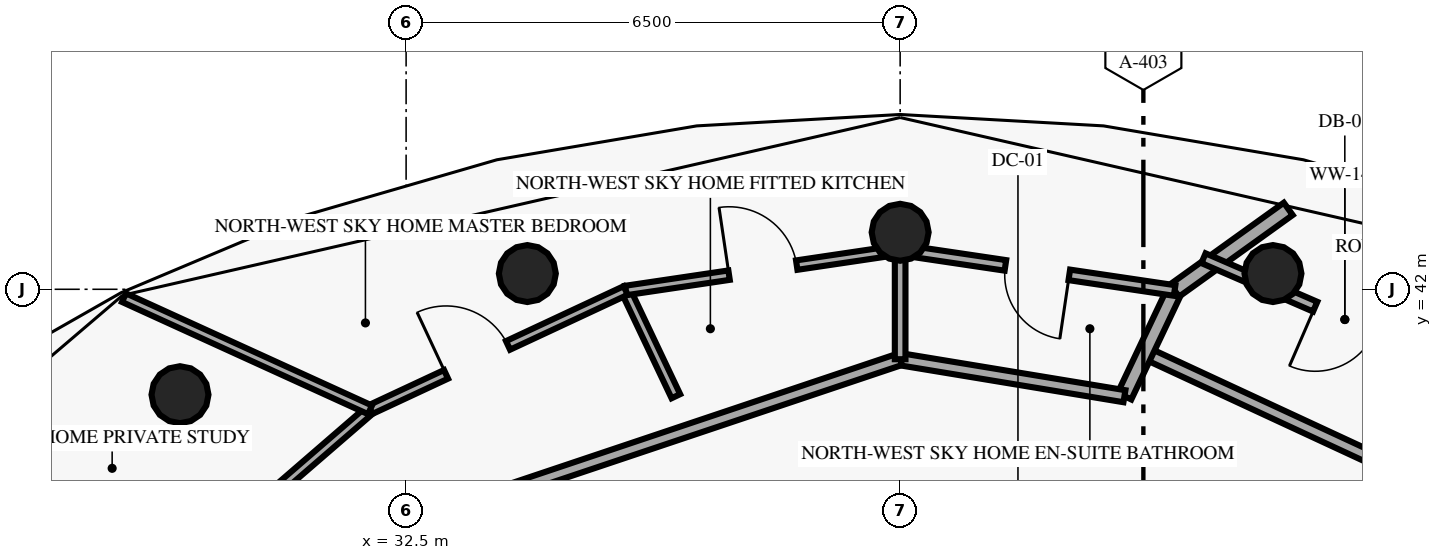
"""IFC4 building model, lengths in metres.
Left out: names, types, materials, properties, quantities, classifications, styles, units other than length and angle.
Written with IfcOpenShell. Run it as: python <this file> out.ifc"""

import sys

from ifc_helpers import new_model, si_unit, direction, frame, frame_2d, origin, origin_2d, place, context, subcontext, project, spatial, rectangle, circle, extrude, element, fill, save


model = new_model("IFC4")
c1 = context("Model", 3, precision=1e-05, world=origin(), true_north=direction((0.0, 1.0)))
c2 = subcontext(c1, "Body", "Model", "MODEL_VIEW")
j1 = project(units=[si_unit("LENGTHUNIT", "METRE"), si_unit("PLANEANGLEUNIT", "RADIAN")], contexts=[c1])
p1 = place(None, origin())
s1 = spatial("IfcSite", under=j1, at=p1, CompositionType="ELEMENT")
p2 = place(p1, origin())
s2 = spatial("IfcBuilding", under=s1, at=p2, CompositionType="ELEMENT")
p3 = place(p2, frame((0.0, 0.0, 297.4)))
s3 = spatial("IfcBuildingStorey", under=s2, at=p3, CompositionType="ELEMENT", Elevation=297.4)
for number, where, z_axis, x_axis in (
    (1, (43.905, 42.207, 0.0), (0.0, 0.0, 1.0), (1.0, 0.0, 0.0)),
    (2, (39.0, 42.75, 0.0), (0.0, 0.0, 1.0), (1.0, 0.0, 0.0)),
    (3, (34.095, 42.207, 0.0), (0.0, 0.0, 1.0), (1.0, 0.0, 0.0)),
    (4, (29.525, 40.613, 0.0), (0.0, 0.0, 1.0), (1.0, 0.0, 0.0)),
):
    element("IfcColumn", number, at=place(p3, frame(where, z_axis=z_axis, x_axis=x_axis)), inside=s3, PredefinedType="COLUMN", context=c2, shape_type="SweptSolid", body=[
        extrude(circle(Radius=0.375, at=origin_2d()), origin(), (0.0, 0.0, 1.0), 3.45),
    ])
p4 = place(p3, frame((45.595, 39.6, 0.0), z_axis=(0.0, 0.0, 1.0), x_axis=(-0.907123576348, 0.420864369166, 0.0)))
e5 = element("IfcWall", 5, at=p4, inside=s3, PredefinedType="PARTITIONING", context=c2, shape_type="SweptSolid", body=[
    extrude(rectangle(XDim=3.719, YDim=0.16, at=frame_2d((1.859, 0.0))), origin(), (0.0, 0.0, 1.0), 3.45),
])
p5 = place(p3, frame((41.951, 40.593, 0.0), z_axis=(0.0, 0.0, 1.0), x_axis=(0.428788325004, 0.903404987998, 0.0)))
e6 = element("IfcWall", 6, at=p5, inside=s3, PredefinedType="PARTITIONING", context=c2, shape_type="SweptSolid", body=[
    extrude(rectangle(XDim=1.54, YDim=0.2, at=frame_2d((0.77, 0.0))), origin(), (0.0, 0.0, 1.0), 3.45),
])
p6 = place(p3, frame((42.611, 41.984, 0.0), z_axis=(0.0, 0.0, 1.0), x_axis=(0.812072329423, 0.583556793967, 0.0)))
e7 = element("IfcWall", 7, at=p6, inside=s3, PredefinedType="PARTITIONING", context=c2, shape_type="SweptSolid", body=[
    extrude(rectangle(XDim=1.841, YDim=0.2, at=frame_2d((0.92, 0.0))), origin(), (0.0, 0.0, 1.0), 3.45),
])
p7 = place(p3, frame((42.991, 42.409, 0.0), z_axis=(0.0, 0.0, 1.0), x_axis=(0.917335052278, -0.398116065818, 0.0)))
e8 = element("IfcWall", 8, at=p7, inside=s3, PredefinedType="PARTITIONING", context=c2, shape_type="SweptSolid", body=[
    extrude(rectangle(XDim=4.054, YDim=0.14, at=frame_2d((2.027, 0.0))), origin(), (0.0, 0.0, 1.0), 3.45),
])
p8 = place(p7, frame((1.602, 0.0, 0.0)))
e9 = element("IfcOpeningElement", 9, at=p8, cuts=e8, PredefinedType="OPENING", context=c2, shape_type="SweptSolid", body=[
    extrude(rectangle(XDim=0.85, YDim=2.1, at=frame_2d((0.425, 1.05))), frame((0.0, 0.08, 0.0), z_axis=(0.0, -1.0, 0.0), x_axis=(1.0, 0.0, 0.0)), (0.0, 0.0, 1.0), 0.16),
])
p9 = place(p3, frame((41.951, 40.593, 0.0), z_axis=(0.0, 0.0, 1.0), x_axis=(-0.986650832406, 0.162850038111, 0.0)))
e10 = element("IfcWall", 10, at=p9, inside=s3, PredefinedType="PARTITIONING", context=c2, shape_type="SweptSolid", body=[
    extrude(rectangle(XDim=2.991, YDim=0.16, at=frame_2d((1.496, 0.0))), origin(), (0.0, 0.0, 1.0), 3.45),
])
p10 = place(p3, frame((39.0, 41.08, 0.0), z_axis=(0.0, 0.0, 1.0), x_axis=(-0.948027514656, -0.318188358455, 0.0)))
e11 = element("IfcWall", 11, at=p10, inside=s3, PredefinedType="PARTITIONING", context=c2, shape_type="SweptSolid", body=[
    extrude(rectangle(XDim=6.012, YDim=0.16, at=frame_2d((3.006, 0.0))), origin(), (0.0, 0.0, 1.0), 3.45),
])
p11 = place(p3, frame((39.0, 41.08, 0.0), z_axis=(0.0, 0.0, 1.0), x_axis=(0.0, 1.0, 0.0)))
e12 = element("IfcWall", 12, at=p11, inside=s3, PredefinedType="PARTITIONING", context=c2, shape_type="SweptSolid", body=[
    extrude(rectangle(XDim=1.44, YDim=0.14, at=frame_2d((0.72, 0.0))), origin(), (0.0, 0.0, 1.0), 3.45),
])
p12 = place(p3, frame((36.049, 40.593, 0.0), z_axis=(0.0, 0.0, 1.0), x_axis=(-0.428788325004, 0.903404987998, 0.0)))
e13 = element("IfcWall", 13, at=p12, inside=s3, PredefinedType="PARTITIONING", context=c2, shape_type="SweptSolid", body=[
    extrude(rectangle(XDim=1.54, YDim=0.125, at=frame_2d((0.77, 0.0))), origin(), (0.0, 0.0, 1.0), 3.45),
])
p13 = place(p3, frame((39.0, 42.52, 0.0), z_axis=(0.0, 0.0, 1.0), x_axis=(0.989157453542, -0.146858884996, 0.0)))
e14 = element("IfcWall", 14, at=p13, inside=s3, PredefinedType="PARTITIONING", context=c2, shape_type="SweptSolid", body=[
    extrude(rectangle(XDim=3.651, YDim=0.14, at=frame_2d((1.825, 0.0))), origin(), (0.0, 0.0, 1.0), 3.45),
])
p14 = place(p13, frame((1.4, 0.0, 0.0)))
e15 = element("IfcOpeningElement", 15, at=p14, cuts=e14, PredefinedType="OPENING", context=c2, shape_type="SweptSolid", body=[
    extrude(rectangle(XDim=0.85, YDim=2.1, at=frame_2d((0.425, 1.05))), frame((0.0, 0.08, 0.0), z_axis=(0.0, -1.0, 0.0), x_axis=(1.0, 0.0, 0.0)), (0.0, 0.0, 1.0), 0.16),
])
p15 = place(p3, frame((35.389, 41.984, 0.0), z_axis=(0.0, 0.0, 1.0), x_axis=(0.989157453542, 0.146858884996, 0.0)))
e16 = element("IfcWall", 16, at=p15, inside=s3, PredefinedType="PARTITIONING", context=c2, shape_type="SweptSolid", body=[
    extrude(rectangle(XDim=3.651, YDim=0.125, at=frame_2d((1.825, 0.0))), origin(), (0.0, 0.0, 1.0), 3.45),
])
p16 = place(p15, frame((1.375, 0.0, 0.0)))
e17 = element("IfcOpeningElement", 17, at=p16, cuts=e16, PredefinedType="OPENING", context=c2, shape_type="SweptSolid", body=[
    extrude(rectangle(XDim=0.9, YDim=2.1, at=frame_2d((0.45, 1.05))), frame((0.0, 0.073, 0.0), z_axis=(0.0, -1.0, 0.0), x_axis=(1.0, 0.0, 0.0)), (0.0, 0.0, 1.0), 0.145),
])
p17 = place(p3, frame((32.025, 40.414, 0.0), z_axis=(0.0, 0.0, 1.0), x_axis=(0.906188180382, 0.422874664334, 0.0)))
e18 = element("IfcWall", 18, at=p17, inside=s3, PredefinedType="PARTITIONING", context=c2, shape_type="SweptSolid", body=[
    extrude(rectangle(XDim=3.712, YDim=0.125, at=frame_2d((1.856, 0.0))), origin(), (0.0, 0.0, 1.0), 3.45),
])
p18 = place(p17, frame((1.104, 0.0, 0.0)))
e19 = element("IfcOpeningElement", 19, at=p18, cuts=e18, PredefinedType="OPENING", context=c2, shape_type="SweptSolid", body=[
    extrude(rectangle(XDim=0.9, YDim=2.1, at=frame_2d((0.45, 1.05))), frame((0.0, 0.073, 0.0), z_axis=(0.0, -1.0, 0.0), x_axis=(1.0, 0.0, 0.0)), (0.0, 0.0, 1.0), 0.145),
])
p19 = place(p3, frame((29.136, 37.916, 0.0), z_axis=(0.0, 0.0, 1.0), x_axis=(0.756424716633, 0.654080765706, 0.0)))
e20 = element("IfcWall", 20, at=p19, inside=s3, PredefinedType="PARTITIONING", context=c2, shape_type="SweptSolid", body=[
    extrude(rectangle(XDim=3.819, YDim=0.125, at=frame_2d((1.91, 0.0))), origin(), (0.0, 0.0, 1.0), 3.45),
])
p20 = place(p19, frame((0.804, 0.0, 0.0)))
e21 = element("IfcOpeningElement", 21, at=p20, cuts=e20, PredefinedType="OPENING", context=c2, shape_type="SweptSolid", body=[
    extrude(rectangle(XDim=0.9, YDim=2.1, at=frame_2d((0.45, 1.05))), frame((0.0, 0.073, 0.0), z_axis=(0.0, -1.0, 0.0), x_axis=(1.0, 0.0, 0.0)), (0.0, 0.0, 1.0), 0.145),
])
p21 = place(p3, frame((32.025, 40.414, 0.0), z_axis=(0.0, 0.0, 1.0), x_axis=(-0.90988404677, 0.414862653698, 0.0)))
e22 = element("IfcWall", 22, at=p21, inside=s3, PredefinedType="PARTITIONING", context=c2, shape_type="SweptSolid", body=[
    extrude(rectangle(XDim=3.557, YDim=0.125, at=frame_2d((1.779, 0.0))), origin(), (0.0, 0.0, 1.0), 3.45),
])
p22 = place(p8, origin())
e23 = element("IfcDoor", 23, at=p22, inside=s3, OperationType="SINGLE_SWING_LEFT", PredefinedType="DOOR", context=c2, shape_type="SweptSolid", body=[
    extrude(rectangle(XDim=0.85, YDim=2.1, at=frame_2d((0.425, 1.05))), frame((0.0, 0.025, 0.0), z_axis=(0.0, -1.0, 0.0), x_axis=(1.0, 0.0, 0.0)), (0.0, 0.0, 1.0), 0.05),
])
fill(e9, e23)
p23 = place(p14, origin())
e24 = element("IfcDoor", 24, at=p23, inside=s3, OperationType="SINGLE_SWING_RIGHT", PredefinedType="DOOR", context=c2, shape_type="SweptSolid", body=[
    extrude(rectangle(XDim=0.85, YDim=2.1, at=frame_2d((0.425, 1.05))), frame((0.0, 0.025, 0.0), z_axis=(0.0, -1.0, 0.0), x_axis=(1.0, 0.0, 0.0)), (0.0, 0.0, 1.0), 0.05),
])
fill(e15, e24)
p24 = place(p16, origin())
e25 = element("IfcDoor", 25, at=p24, inside=s3, OperationType="SINGLE_SWING_LEFT", PredefinedType="DOOR", context=c2, shape_type="SweptSolid", body=[
    extrude(rectangle(XDim=0.9, YDim=2.1, at=frame_2d((0.45, 1.05))), frame((0.0, 0.025, 0.0), z_axis=(0.0, -1.0, 0.0), x_axis=(1.0, 0.0, 0.0)), (0.0, 0.0, 1.0), 0.05),
])
fill(e17, e25)
p25 = place(p18, origin())
e26 = element("IfcDoor", 26, at=p25, inside=s3, OperationType="SINGLE_SWING_LEFT", PredefinedType="DOOR", context=c2, shape_type="SweptSolid", body=[
    extrude(rectangle(XDim=0.9, YDim=2.1, at=frame_2d((0.45, 1.05))), frame((0.0, 0.025, 0.0), z_axis=(0.0, -1.0, 0.0), x_axis=(1.0, 0.0, 0.0)), (0.0, 0.0, 1.0), 0.05),
])
fill(e19, e26)
save(model, sys.argv[1])
